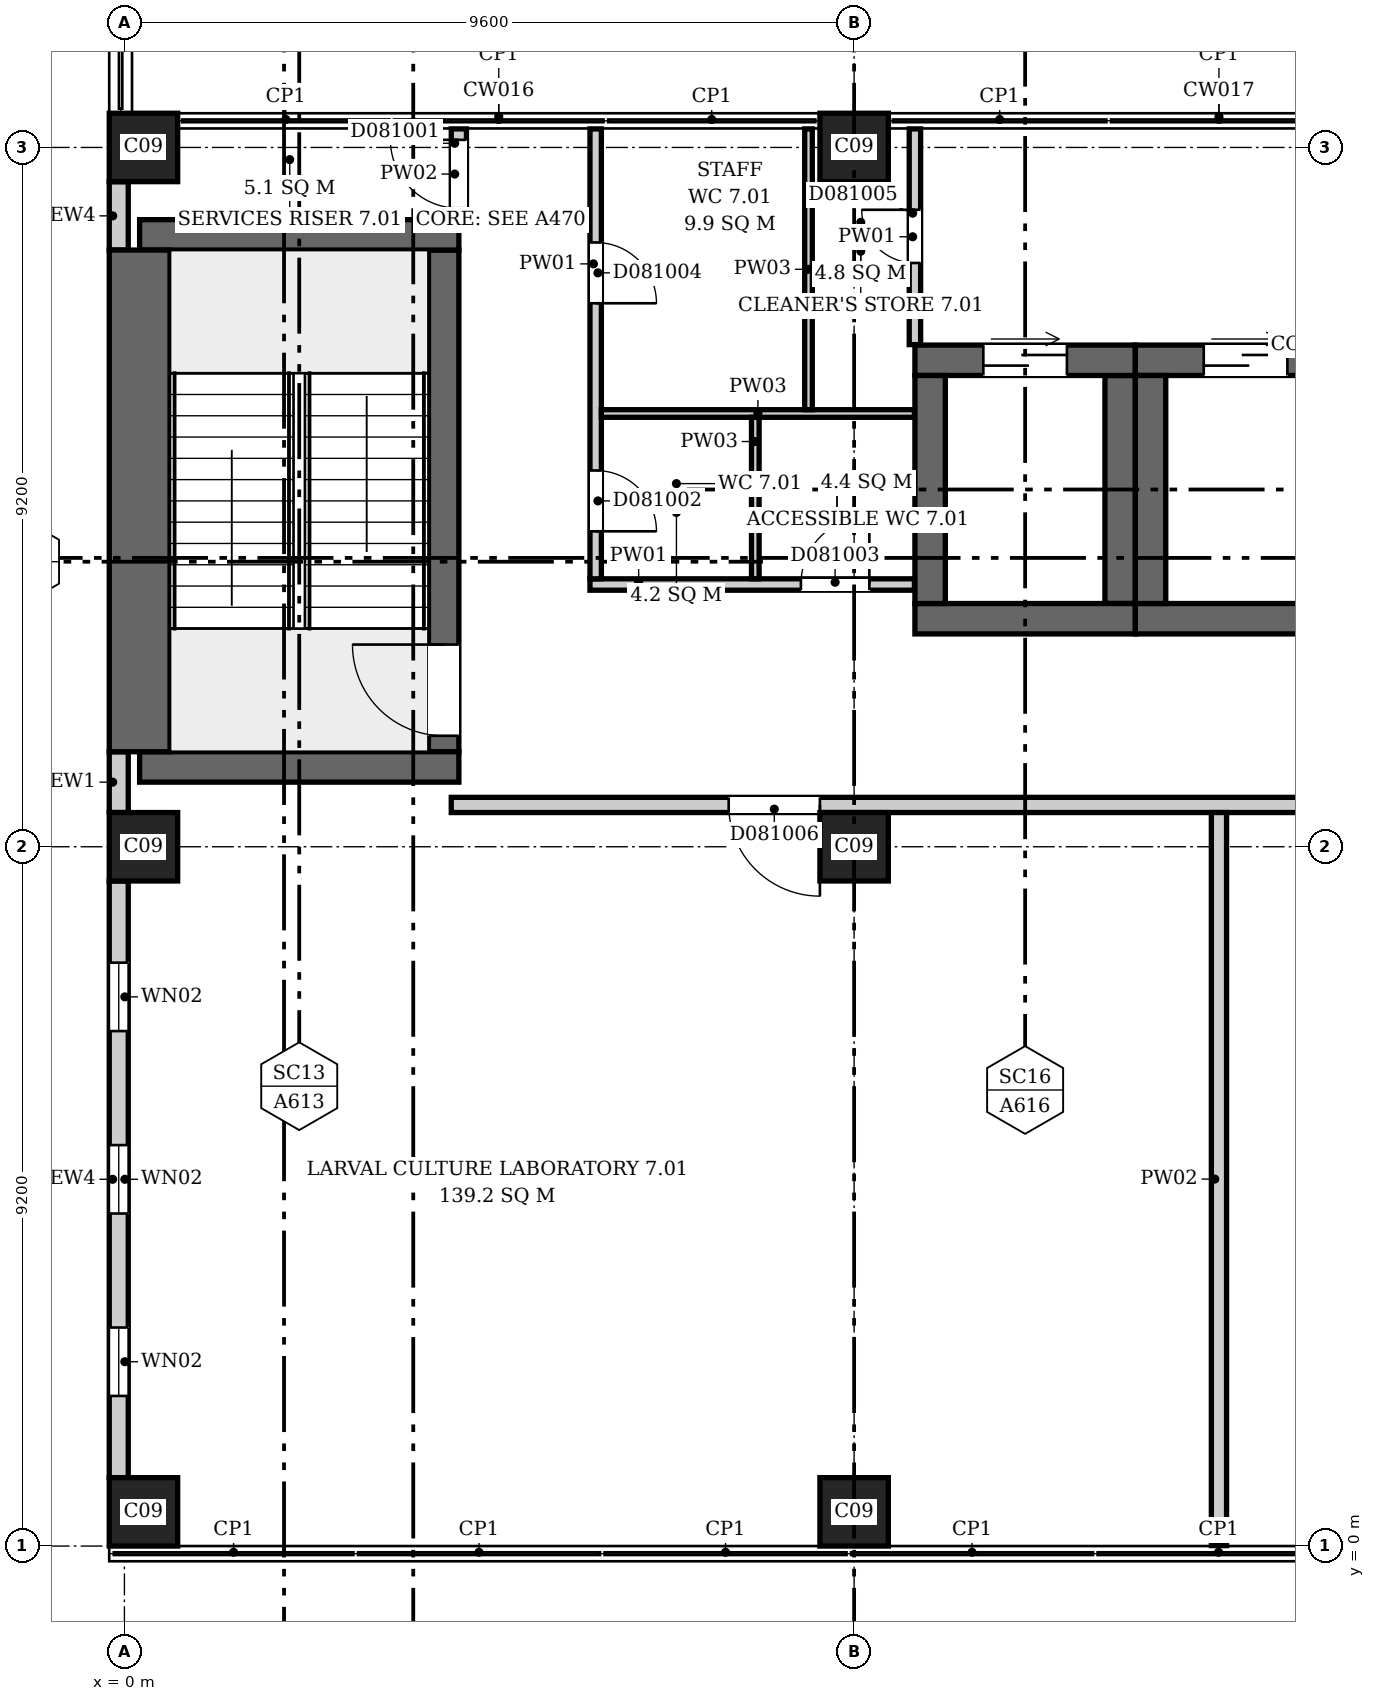
"""IFC4 building model, lengths in metres.
Left out: names, types, materials, properties, quantities, classifications, styles, units other than length and angle.
Written with IfcOpenShell. Run it as: python <this file> out.ifc"""

import sys

from ifc_helpers import new_model, si_unit, direction, frame, frame_2d, origin, origin_2d, place, context, subcontext, project, spatial, rectangle, extrude, element, fill, save


model = new_model("IFC4")
c1 = context("Model", 3, precision=1e-05, world=origin(), true_north=direction((0.0, 1.0)))
c2 = subcontext(c1, "Body", "Model", "MODEL_VIEW")
j1 = project(units=[si_unit("LENGTHUNIT", "METRE"), si_unit("PLANEANGLEUNIT", "RADIAN")], contexts=[c1])
p1 = place(None, origin())
s1 = spatial("IfcSite", under=j1, at=p1, CompositionType="ELEMENT")
p2 = place(p1, origin())
s2 = spatial("IfcBuilding", under=s1, at=p2, CompositionType="ELEMENT")
p3 = place(p2, frame((0.0, 0.0, 40.3)))
s3 = spatial("IfcBuildingStorey", under=s2, at=p3, CompositionType="ELEMENT", Elevation=40.3)
for number, where, z_axis, x_axis in (
    (1, (0.2, 10.25, 0.0), (0.0, 0.0, 1.0), (1.0, 0.0, 0.0)),
    (2, (0.2, 17.25, 0.0), (0.0, 0.0, 1.0), (1.0, 0.0, 0.0)),
):
    element("IfcWall", number, at=place(p3, frame(where, z_axis=z_axis, x_axis=x_axis)), inside=s3, PredefinedType="SHEAR", context=c2, shape_type="SweptSolid", body=[
        extrude(rectangle(XDim=4.2, YDim=0.4, at=frame_2d((2.1, 0.0))), origin(), (0.0, 0.0, 1.0), 4.2),
    ])
p4 = place(p3, frame((0.2, 10.45, 0.0), z_axis=(0.0, 0.0, 1.0), x_axis=(0.0, 1.0, 0.0)))
e3 = element("IfcWall", 3, at=p4, inside=s3, PredefinedType="SHEAR", context=c2, shape_type="SweptSolid", body=[
    extrude(rectangle(XDim=6.6, YDim=0.8, at=frame_2d((3.3, 0.0))), origin(), (0.0, 0.0, 1.0), 4.2),
])
p5 = place(p3, frame((4.2, 10.45, 0.0), z_axis=(0.0, 0.0, 1.0), x_axis=(0.0, 1.0, 0.0)))
e4 = element("IfcWall", 4, at=p5, inside=s3, PredefinedType="SHEAR", context=c2, shape_type="SweptSolid", body=[
    extrude(rectangle(XDim=6.6, YDim=0.4, at=frame_2d((3.3, 0.0))), origin(), (0.0, 0.0, 1.0), 4.2),
])
p6 = place(p5, frame((0.21, 0.0, 0.0)))
e5 = element("IfcOpeningElement", 5, at=p6, cuts=e4, PredefinedType="OPENING", context=c2, shape_type="SweptSolid", body=[
    extrude(rectangle(XDim=1.2, YDim=2.1, at=frame_2d((0.6, 1.05))), frame((0.0, 0.21, 0.0), z_axis=(0.0, -1.0, 0.0), x_axis=(1.0, 0.0, 0.0)), (0.0, 0.0, 1.0), 0.42),
])
p7 = place(p3, frame((10.4, 12.2, 0.0), z_axis=(0.0, 0.0, 1.0), x_axis=(1.0, 0.0, 0.0)))
e6 = element("IfcWall", 6, at=p7, inside=s3, PredefinedType="SHEAR", context=c2, shape_type="SweptSolid", body=[
    extrude(rectangle(XDim=2.9, YDim=0.4, at=frame_2d((1.45, 0.0))), origin(), (0.0, 0.0, 1.0), 4.2),
])
p8 = place(p3, frame((10.4, 15.6, 0.0), z_axis=(0.0, 0.0, 1.0), x_axis=(1.0, 0.0, 0.0)))
e7 = element("IfcWall", 7, at=p8, inside=s3, PredefinedType="SHEAR", context=c2, shape_type="SweptSolid", body=[
    extrude(rectangle(XDim=2.9, YDim=0.4, at=frame_2d((1.45, 0.0))), origin(), (0.0, 0.0, 1.0), 4.2),
])
p9 = place(p8, frame((0.9, 0.0, 0.0)))
e8 = element("IfcOpeningElement", 8, at=p9, cuts=e7, PredefinedType="OPENING", context=c2, shape_type="SweptSolid", body=[
    extrude(rectangle(XDim=1.1, YDim=2.1, at=frame_2d((0.55, 1.05))), frame((0.0, 0.21, 0.0), z_axis=(0.0, -1.0, 0.0), x_axis=(1.0, 0.0, 0.0)), (0.0, 0.0, 1.0), 0.42),
])
for number, where, z_axis, x_axis in (
    (9, (10.6, 12.4, 0.0), (0.0, 0.0, 1.0), (0.0, 1.0, 0.0)),
    (10, (13.1, 12.4, 0.0), (0.0, 0.0, 1.0), (0.0, 1.0, 0.0)),
):
    element("IfcWall", number, at=place(p3, frame(where, z_axis=z_axis, x_axis=x_axis)), inside=s3, PredefinedType="SHEAR", context=c2, shape_type="SweptSolid", body=[
        extrude(rectangle(XDim=3.0, YDim=0.4, at=frame_2d((1.5, 0.0))), origin(), (0.0, 0.0, 1.0), 4.2),
    ])
p10 = place(p3, frame((13.3, 12.2, 0.0), z_axis=(0.0, 0.0, 1.0), x_axis=(1.0, 0.0, 0.0)))
e11 = element("IfcWall", 11, at=p10, inside=s3, PredefinedType="SHEAR", context=c2, shape_type="SweptSolid", body=[
    extrude(rectangle(XDim=2.9, YDim=0.4, at=frame_2d((1.45, 0.0))), origin(), (0.0, 0.0, 1.0), 4.2),
])
p11 = place(p3, frame((13.3, 15.6, 0.0), z_axis=(0.0, 0.0, 1.0), x_axis=(1.0, 0.0, 0.0)))
e12 = element("IfcWall", 12, at=p11, inside=s3, PredefinedType="SHEAR", context=c2, shape_type="SweptSolid", body=[
    extrude(rectangle(XDim=2.9, YDim=0.4, at=frame_2d((1.45, 0.0))), origin(), (0.0, 0.0, 1.0), 4.2),
])
p12 = place(p11, frame((0.9, 0.0, 0.0)))
e13 = element("IfcOpeningElement", 13, at=p12, cuts=e12, PredefinedType="OPENING", context=c2, shape_type="SweptSolid", body=[
    extrude(rectangle(XDim=1.1, YDim=2.1, at=frame_2d((0.55, 1.05))), frame((0.0, 0.21, 0.0), z_axis=(0.0, -1.0, 0.0), x_axis=(1.0, 0.0, 0.0)), (0.0, 0.0, 1.0), 0.42),
])
p13 = place(p3, frame((13.5, 12.4, 0.0), z_axis=(0.0, 0.0, 1.0), x_axis=(0.0, 1.0, 0.0)))
e14 = element("IfcWall", 14, at=p13, inside=s3, PredefinedType="SHEAR", context=c2, shape_type="SweptSolid", body=[
    extrude(rectangle(XDim=3.0, YDim=0.4, at=frame_2d((1.5, 0.0))), origin(), (0.0, 0.0, 1.0), 4.2),
])
for number, where, z_axis, x_axis in (
    (15, (0.25, 0.45, 0.0), (0.0, 0.0, 1.0), (1.0, 0.0, 0.0)),
    (16, (9.6, 0.45, 0.0), (0.0, 0.0, 1.0), (1.0, 0.0, 0.0)),
    (17, (0.25, 9.2, 0.0), (0.0, 0.0, 1.0), (1.0, 0.0, 0.0)),
    (18, (9.6, 9.2, 0.0), (0.0, 0.0, 1.0), (1.0, 0.0, 0.0)),
    (19, (0.25, 18.4, 0.0), (0.0, 0.0, 1.0), (1.0, 0.0, 0.0)),
    (20, (9.6, 18.4, 0.0), (0.0, 0.0, 1.0), (1.0, 0.0, 0.0)),
):
    element("IfcColumn", number, at=place(p3, frame(where, z_axis=z_axis, x_axis=x_axis)), inside=s3, PredefinedType="COLUMN", context=c2, shape_type="SweptSolid", body=[
        extrude(rectangle(XDim=0.9, YDim=0.9, at=origin_2d()), origin(), (0.0, 0.0, 1.0), 4.2),
    ])
p14 = place(p3, frame((-0.074, 8.75, 0.0), z_axis=(0.0, 0.0, 1.0), x_axis=(0.0, -1.0, 0.0)))
e21 = element("IfcWall", 21, at=p14, inside=s3, PredefinedType="ELEMENTEDWALL", context=c2, shape_type="SweptSolid", body=[
    extrude(rectangle(XDim=7.85, YDim=0.25, at=frame_2d((3.925, 0.0))), origin(), (0.0, 0.0, 1.0), 3.9),
])
p15 = place(p14, frame((5.875, 0.0, 0.9)))
e22 = element("IfcOpeningElement", 22, at=p15, cuts=e21, PredefinedType="OPENING", context=c2, shape_type="SweptSolid", body=[
    extrude(rectangle(XDim=0.9, YDim=2.6, at=frame_2d((0.45, 1.3))), frame((0.0, 0.135, 0.0), z_axis=(0.0, -1.0, 0.0), x_axis=(1.0, 0.0, 0.0)), (0.0, 0.0, 1.0), 0.27),
])
p16 = place(p14, frame((3.475, 0.0, 0.9)))
e23 = element("IfcOpeningElement", 23, at=p16, cuts=e21, PredefinedType="OPENING", context=c2, shape_type="SweptSolid", body=[
    extrude(rectangle(XDim=0.9, YDim=2.6, at=frame_2d((0.45, 1.3))), frame((0.0, 0.135, 0.0), z_axis=(0.0, -1.0, 0.0), x_axis=(1.0, 0.0, 0.0)), (0.0, 0.0, 1.0), 0.27),
])
p17 = place(p14, frame((1.075, 0.0, 0.9)))
e24 = element("IfcOpeningElement", 24, at=p17, cuts=e21, PredefinedType="OPENING", context=c2, shape_type="SweptSolid", body=[
    extrude(rectangle(XDim=0.9, YDim=2.6, at=frame_2d((0.45, 1.3))), frame((0.0, 0.135, 0.0), z_axis=(0.0, -1.0, 0.0), x_axis=(1.0, 0.0, 0.0)), (0.0, 0.0, 1.0), 0.27),
])
p18 = place(p3, frame((-0.074, 10.45, 0.0), z_axis=(0.0, 0.0, 1.0), x_axis=(0.0, -1.0, 0.0)))
e25 = element("IfcWall", 25, at=p18, inside=s3, PredefinedType="ELEMENTEDWALL", context=c2, shape_type="SweptSolid", body=[
    extrude(rectangle(XDim=0.8, YDim=0.25, at=frame_2d((0.4, 0.0))), origin(), (0.0, 0.0, 1.0), 3.9),
])
p19 = place(p3, frame((-0.074, 17.95, 0.0), z_axis=(0.0, 0.0, 1.0), x_axis=(0.0, -1.0, 0.0)))
e26 = element("IfcWall", 26, at=p19, inside=s3, PredefinedType="ELEMENTEDWALL", context=c2, shape_type="SweptSolid", body=[
    extrude(rectangle(XDim=0.9, YDim=0.25, at=frame_2d((0.45, 0.0))), origin(), (0.0, 0.0, 1.0), 3.9),
])
p20 = place(p3, frame((4.3, 9.75, 0.0), z_axis=(0.0, 0.0, 1.0), x_axis=(1.0, 0.0, 0.0)))
e27 = element("IfcWall", 27, at=p20, inside=s3, PredefinedType="PARTITIONING", context=c2, shape_type="SweptSolid", body=[
    extrude(rectangle(XDim=43.894, YDim=0.2, at=frame_2d((21.947, 0.0))), origin(), (0.0, 0.0, 1.0), 3.9),
])
p21 = place(p20, frame((3.65, 0.0, 0.0)))
e28 = element("IfcOpeningElement", 28, at=p21, cuts=e27, PredefinedType="OPENING", context=c2, shape_type="SweptSolid", body=[
    extrude(rectangle(XDim=1.2, YDim=2.1, at=frame_2d((0.6, 1.05))), frame((0.0, 0.11, 0.0), z_axis=(0.0, -1.0, 0.0), x_axis=(1.0, 0.0, 0.0)), (0.0, 0.0, 1.0), 0.22),
])
p22 = place(p20, frame((16.7, 0.0, 0.0)))
e29 = element("IfcOpeningElement", 29, at=p22, cuts=e27, PredefinedType="OPENING", context=c2, shape_type="SweptSolid", body=[
    extrude(rectangle(XDim=1.2, YDim=2.1, at=frame_2d((0.6, 1.05))), frame((0.0, 0.11, 0.0), z_axis=(0.0, -1.0, 0.0), x_axis=(1.0, 0.0, 0.0)), (0.0, 0.0, 1.0), 0.22),
])
p23 = place(p20, frame((26.45, 0.0, 0.0)))
e30 = element("IfcOpeningElement", 30, at=p23, cuts=e27, PredefinedType="OPENING", context=c2, shape_type="SweptSolid", body=[
    extrude(rectangle(XDim=0.9, YDim=2.1, at=frame_2d((0.45, 1.05))), frame((0.0, 0.11, 0.0), z_axis=(0.0, -1.0, 0.0), x_axis=(1.0, 0.0, 0.0)), (0.0, 0.0, 1.0), 0.22),
])
p24 = place(p20, frame((36.0, 0.0, 0.0)))
e31 = element("IfcOpeningElement", 31, at=p24, cuts=e27, PredefinedType="OPENING", context=c2, shape_type="SweptSolid", body=[
    extrude(rectangle(XDim=1.2, YDim=2.1, at=frame_2d((0.6, 1.05))), frame((0.0, 0.11, 0.0), z_axis=(0.0, -1.0, 0.0), x_axis=(1.0, 0.0, 0.0)), (0.0, 0.0, 1.0), 0.22),
])
p25 = place(p3, frame((4.4, 17.456, 0.0), z_axis=(0.0, 0.0, 1.0), x_axis=(0.0, 1.0, 0.0)))
e32 = element("IfcWall", 32, at=p25, inside=s3, PredefinedType="PARTITIONING", context=c2, shape_type="SweptSolid", body=[
    extrude(rectangle(XDim=1.188, YDim=0.2, at=frame_2d((0.594, 0.0))), origin(), (0.0, 0.0, 1.0), 3.9),
])
p26 = place(p25, frame((0.144, 0.0, 0.0)))
e33 = element("IfcOpeningElement", 33, at=p26, cuts=e32, PredefinedType="OPENING", context=c2, shape_type="SweptSolid", body=[
    extrude(rectangle(XDim=0.9, YDim=2.1, at=frame_2d((0.45, 1.05))), frame((0.0, 0.11, 0.0), z_axis=(0.0, -1.0, 0.0), x_axis=(1.0, 0.0, 0.0)), (0.0, 0.0, 1.0), 0.22),
])
p27 = place(p3, frame((6.125, 12.65, 0.0), z_axis=(0.0, 0.0, 1.0), x_axis=(1.0, 0.0, 0.0)))
e34 = element("IfcWall", 34, at=p27, inside=s3, PredefinedType="PARTITIONING", context=c2, shape_type="SweptSolid", body=[
    extrude(rectangle(XDim=4.269, YDim=0.15, at=frame_2d((2.135, 0.0))), origin(), (0.0, 0.0, 1.0), 3.9),
])
p28 = place(p27, frame((2.775, 0.0, 0.0)))
e35 = element("IfcOpeningElement", 35, at=p28, cuts=e34, PredefinedType="OPENING", context=c2, shape_type="SweptSolid", body=[
    extrude(rectangle(XDim=0.9, YDim=2.1, at=frame_2d((0.45, 1.05))), frame((0.0, 0.085, 0.0), z_axis=(0.0, -1.0, 0.0), x_axis=(1.0, 0.0, 0.0)), (0.0, 0.0, 1.0), 0.17),
])
p29 = place(p3, frame((6.2, 12.725, 0.0), z_axis=(0.0, 0.0, 1.0), x_axis=(0.0, 1.0, 0.0)))
e36 = element("IfcWall", 36, at=p29, inside=s3, PredefinedType="PARTITIONING", context=c2, shape_type="SweptSolid", body=[
    extrude(rectangle(XDim=5.919, YDim=0.15, at=frame_2d((2.959, 0.0))), origin(), (0.0, 0.0, 1.0), 3.9),
])
p30 = place(p29, frame((0.625, 0.0, 0.0)))
e37 = element("IfcOpeningElement", 37, at=p30, cuts=e36, PredefinedType="OPENING", context=c2, shape_type="SweptSolid", body=[
    extrude(rectangle(XDim=0.8, YDim=2.1, at=frame_2d((0.4, 1.05))), frame((0.0, 0.085, 0.0), z_axis=(0.0, -1.0, 0.0), x_axis=(1.0, 0.0, 0.0)), (0.0, 0.0, 1.0), 0.17),
])
p31 = place(p29, frame((3.625, 0.0, 0.0)))
e38 = element("IfcOpeningElement", 38, at=p31, cuts=e36, PredefinedType="OPENING", context=c2, shape_type="SweptSolid", body=[
    extrude(rectangle(XDim=0.8, YDim=2.1, at=frame_2d((0.4, 1.05))), frame((0.0, 0.085, 0.0), z_axis=(0.0, -1.0, 0.0), x_axis=(1.0, 0.0, 0.0)), (0.0, 0.0, 1.0), 0.17),
])
p32 = place(p3, frame((6.275, 14.9, 0.0), z_axis=(0.0, 0.0, 1.0), x_axis=(1.0, 0.0, 0.0)))
e39 = element("IfcWall", 39, at=p32, inside=s3, PredefinedType="PARTITIONING", context=c2, shape_type="SweptSolid", body=[
    extrude(rectangle(XDim=4.119, YDim=0.1, at=frame_2d((2.06, 0.0))), origin(), (0.0, 0.0, 1.0), 3.9),
])
p33 = place(p3, frame((8.3, 12.725, 0.0), z_axis=(0.0, 0.0, 1.0), x_axis=(0.0, 1.0, 0.0)))
e40 = element("IfcWall", 40, at=p33, inside=s3, PredefinedType="PARTITIONING", context=c2, shape_type="SweptSolid", body=[
    extrude(rectangle(XDim=2.125, YDim=0.1, at=frame_2d((1.062, 0.0))), origin(), (0.0, 0.0, 1.0), 3.9),
])
p34 = place(p3, frame((9.0, 14.95, 0.0), z_axis=(0.0, 0.0, 1.0), x_axis=(0.0, 1.0, 0.0)))
e41 = element("IfcWall", 41, at=p34, inside=s3, PredefinedType="PARTITIONING", context=c2, shape_type="SweptSolid", body=[
    extrude(rectangle(XDim=3.694, YDim=0.1, at=frame_2d((1.847, 0.0))), origin(), (0.0, 0.0, 1.0), 3.9),
])
p35 = place(p3, frame((10.4, 15.806, 0.0), z_axis=(0.0, 0.0, 1.0), x_axis=(0.0, 1.0, 0.0)))
e42 = element("IfcWall", 42, at=p35, inside=s3, PredefinedType="PARTITIONING", context=c2, shape_type="SweptSolid", body=[
    extrude(rectangle(XDim=2.838, YDim=0.15, at=frame_2d((1.419, 0.0))), origin(), (0.0, 0.0, 1.0), 3.9),
])
p36 = place(p35, frame((1.074, 0.0, 0.0)))
e43 = element("IfcOpeningElement", 43, at=p36, cuts=e42, PredefinedType="OPENING", context=c2, shape_type="SweptSolid", body=[
    extrude(rectangle(XDim=0.7, YDim=2.1, at=frame_2d((0.35, 1.05))), frame((0.0, 0.085, 0.0), z_axis=(0.0, -1.0, 0.0), x_axis=(1.0, 0.0, 0.0)), (0.0, 0.0, 1.0), 0.17),
])
p37 = place(p3, frame((14.4, 0.006, 0.0), z_axis=(0.0, 0.0, 1.0), x_axis=(0.0, 1.0, 0.0)))
e44 = element("IfcWall", 44, at=p37, inside=s3, PredefinedType="PARTITIONING", context=c2, shape_type="SweptSolid", body=[
    extrude(rectangle(XDim=9.644, YDim=0.2, at=frame_2d((4.822, 0.0))), origin(), (0.0, 0.0, 1.0), 3.9),
])
p38 = place(p15, origin())
e45 = element("IfcWindow", 45, at=p38, inside=s3, PartitioningType="SINGLE_PANEL", PredefinedType="WINDOW", context=c2, shape_type="SweptSolid", body=[
    extrude(rectangle(XDim=0.9, YDim=2.6, at=frame_2d((0.45, 1.3))), frame((0.0, 0.03, 0.0), z_axis=(0.0, -1.0, 0.0), x_axis=(1.0, 0.0, 0.0)), (0.0, 0.0, 1.0), 0.06),
])
fill(e22, e45)
p39 = place(p16, origin())
e46 = element("IfcWindow", 46, at=p39, inside=s3, PartitioningType="SINGLE_PANEL", PredefinedType="WINDOW", context=c2, shape_type="SweptSolid", body=[
    extrude(rectangle(XDim=0.9, YDim=2.6, at=frame_2d((0.45, 1.3))), frame((0.0, 0.03, 0.0), z_axis=(0.0, -1.0, 0.0), x_axis=(1.0, 0.0, 0.0)), (0.0, 0.0, 1.0), 0.06),
])
fill(e23, e46)
p40 = place(p17, origin())
e47 = element("IfcWindow", 47, at=p40, inside=s3, PartitioningType="SINGLE_PANEL", PredefinedType="WINDOW", context=c2, shape_type="SweptSolid", body=[
    extrude(rectangle(XDim=0.9, YDim=2.6, at=frame_2d((0.45, 1.3))), frame((0.0, 0.03, 0.0), z_axis=(0.0, -1.0, 0.0), x_axis=(1.0, 0.0, 0.0)), (0.0, 0.0, 1.0), 0.06),
])
fill(e24, e47)
p41 = place(p6, origin())
e48 = element("IfcDoor", 48, at=p41, inside=s3, OperationType="SINGLE_SWING_RIGHT", PredefinedType="DOOR", context=c2, shape_type="SweptSolid", body=[
    extrude(rectangle(XDim=1.2, YDim=2.1, at=frame_2d((0.6, 1.05))), frame((0.0, 0.025, 0.0), z_axis=(0.0, -1.0, 0.0), x_axis=(1.0, 0.0, 0.0)), (0.0, 0.0, 1.0), 0.05),
])
fill(e5, e48)
p42 = place(p9, origin())
e49 = element("IfcDoor", 49, at=p42, inside=s3, OperationType="DOUBLE_DOOR_SLIDING", PredefinedType="DOOR", context=c2, shape_type="SweptSolid", body=[
    extrude(rectangle(XDim=1.1, YDim=2.1, at=frame_2d((0.55, 1.05))), frame((0.0, 0.025, 0.0), z_axis=(0.0, -1.0, 0.0), x_axis=(1.0, 0.0, 0.0)), (0.0, 0.0, 1.0), 0.05),
])
fill(e8, e49)
p43 = place(p12, origin())
e50 = element("IfcDoor", 50, at=p43, inside=s3, OperationType="DOUBLE_DOOR_SLIDING", PredefinedType="DOOR", context=c2, shape_type="SweptSolid", body=[
    extrude(rectangle(XDim=1.1, YDim=2.1, at=frame_2d((0.55, 1.05))), frame((0.0, 0.025, 0.0), z_axis=(0.0, -1.0, 0.0), x_axis=(1.0, 0.0, 0.0)), (0.0, 0.0, 1.0), 0.05),
])
fill(e13, e50)
p44 = place(p26, origin())
e51 = element("IfcDoor", 51, at=p44, inside=s3, OperationType="SINGLE_SWING_LEFT", PredefinedType="DOOR", context=c2, shape_type="SweptSolid", body=[
    extrude(rectangle(XDim=0.9, YDim=2.1, at=frame_2d((0.45, 1.05))), frame((0.0, 0.025, 0.0), z_axis=(0.0, -1.0, 0.0), x_axis=(1.0, 0.0, 0.0)), (0.0, 0.0, 1.0), 0.05),
])
fill(e33, e51)
p45 = place(p30, origin())
e52 = element("IfcDoor", 52, at=p45, inside=s3, OperationType="SINGLE_SWING_LEFT", PredefinedType="DOOR", context=c2, shape_type="SweptSolid", body=[
    extrude(rectangle(XDim=0.8, YDim=2.1, at=frame_2d((0.4, 1.05))), frame((0.0, 0.025, 0.0), z_axis=(0.0, -1.0, 0.0), x_axis=(1.0, 0.0, 0.0)), (0.0, 0.0, 1.0), 0.05),
])
fill(e37, e52)
p46 = place(p28, origin())
e53 = element("IfcDoor", 53, at=p46, inside=s3, OperationType="SINGLE_SWING_RIGHT", PredefinedType="DOOR", context=c2, shape_type="SweptSolid", body=[
    extrude(rectangle(XDim=0.9, YDim=2.1, at=frame_2d((0.45, 1.05))), frame((0.0, 0.025, 0.0), z_axis=(0.0, -1.0, 0.0), x_axis=(1.0, 0.0, 0.0)), (0.0, 0.0, 1.0), 0.05),
])
fill(e35, e53)
p47 = place(p31, origin())
e54 = element("IfcDoor", 54, at=p47, inside=s3, OperationType="SINGLE_SWING_LEFT", PredefinedType="DOOR", context=c2, shape_type="SweptSolid", body=[
    extrude(rectangle(XDim=0.8, YDim=2.1, at=frame_2d((0.4, 1.05))), frame((0.0, 0.025, 0.0), z_axis=(0.0, -1.0, 0.0), x_axis=(1.0, 0.0, 0.0)), (0.0, 0.0, 1.0), 0.05),
])
fill(e38, e54)
p48 = place(p36, origin())
e55 = element("IfcDoor", 55, at=p48, inside=s3, OperationType="SINGLE_SWING_LEFT", PredefinedType="DOOR", context=c2, shape_type="SweptSolid", body=[
    extrude(rectangle(XDim=0.7, YDim=2.1, at=frame_2d((0.35, 1.05))), frame((0.0, 0.025, 0.0), z_axis=(0.0, -1.0, 0.0), x_axis=(1.0, 0.0, 0.0)), (0.0, 0.0, 1.0), 0.05),
])
fill(e43, e55)
p49 = place(p21, origin())
e56 = element("IfcDoor", 56, at=p49, inside=s3, OperationType="SINGLE_SWING_RIGHT", PredefinedType="DOOR", context=c2, shape_type="SweptSolid", body=[
    extrude(rectangle(XDim=1.2, YDim=2.1, at=frame_2d((0.6, 1.05))), frame((0.0, 0.025, 0.0), z_axis=(0.0, -1.0, 0.0), x_axis=(1.0, 0.0, 0.0)), (0.0, 0.0, 1.0), 0.05),
])
fill(e28, e56)
save(model, sys.argv[1])
